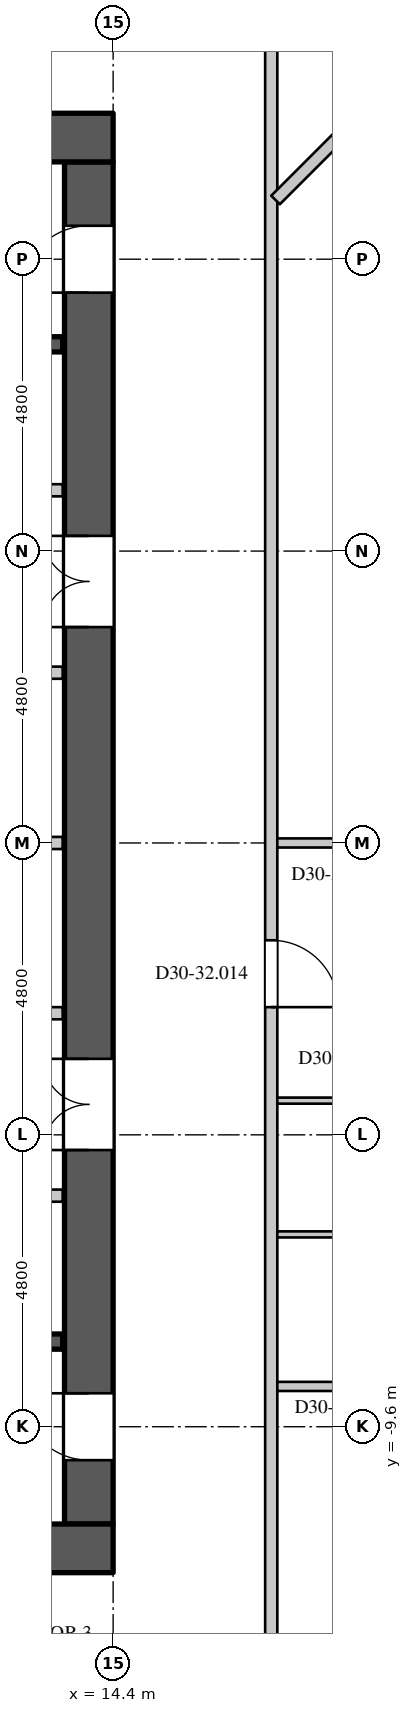
"""IFC4 building model, lengths in metres.
Left out: names, types, materials, properties, quantities, classifications, styles, units other than length and angle.
Written with IfcOpenShell. Run it as: python <this file> out.ifc"""

import sys

from ifc_helpers import new_model, si_unit, direction, frame, frame_2d, origin, place, context, subcontext, project, spatial, rectangle, extrude, element, fill, save


model = new_model("IFC4")
c1 = context("Model", 3, precision=1e-05, world=origin(), true_north=direction((0.0, 1.0)))
c2 = subcontext(c1, "Body", "Model", "MODEL_VIEW")
j1 = project(units=[si_unit("LENGTHUNIT", "METRE"), si_unit("PLANEANGLEUNIT", "RADIAN")], contexts=[c1])
p1 = place(None, origin())
s1 = spatial("IfcSite", under=j1, at=p1, CompositionType="ELEMENT")
p2 = place(p1, origin())
s2 = spatial("IfcBuilding", under=s1, at=p2, CompositionType="ELEMENT")
p3 = place(p2, frame((0.0, 0.0, 131.7)))
s3 = spatial("IfcBuildingStorey", under=s2, at=p3, CompositionType="ELEMENT", Elevation=131.7)
for number, where, z_axis, x_axis in (
    (1, (-14.4, 11.6, 0.0), (0.0, 0.0, 1.0), (1.0, 0.0, 0.0)),
    (2, (-14.4, -11.6, 0.0), (0.0, 0.0, 1.0), (1.0, 0.0, 0.0)),
):
    element("IfcWall", number, at=place(p3, frame(where, z_axis=z_axis, x_axis=x_axis)), inside=s3, PredefinedType="SHEAR", context=c2, shape_type="SweptSolid", body=[
        extrude(rectangle(XDim=28.8, YDim=0.8, at=frame_2d((14.4, 0.0))), origin(), (0.0, 0.0, 1.0), 4.2),
    ])
p4 = place(p3, frame((14.0, -11.2, 0.0), z_axis=(0.0, 0.0, 1.0), x_axis=(0.0, 1.0, 0.0)))
e3 = element("IfcWall", 3, at=p4, inside=s3, PredefinedType="SHEAR", context=c2, shape_type="SweptSolid", body=[
    extrude(rectangle(XDim=22.4, YDim=0.8, at=frame_2d((11.2, 0.0))), origin(), (0.0, 0.0, 1.0), 4.2),
])
p5 = place(p4, frame((20.25, 0.0, 0.0)))
e4 = element("IfcOpeningElement", 4, at=p5, cuts=e3, PredefinedType="OPENING", context=c2, shape_type="SweptSolid", body=[
    extrude(rectangle(XDim=1.1, YDim=2.2, at=frame_2d((0.55, 1.1))), frame((0.0, 0.41, 0.0), z_axis=(0.0, -1.0, 0.0), x_axis=(1.0, 0.0, 0.0)), (0.0, 0.0, 1.0), 0.82),
])
p6 = place(p4, frame((1.05, 0.0, 0.0)))
e5 = element("IfcOpeningElement", 5, at=p6, cuts=e3, PredefinedType="OPENING", context=c2, shape_type="SweptSolid", body=[
    extrude(rectangle(XDim=1.1, YDim=2.2, at=frame_2d((0.55, 1.1))), frame((0.0, 0.41, 0.0), z_axis=(0.0, -1.0, 0.0), x_axis=(1.0, 0.0, 0.0)), (0.0, 0.0, 1.0), 0.82),
])
p7 = place(p4, frame((14.75, 0.0, 0.0)))
e6 = element("IfcOpeningElement", 6, at=p7, cuts=e3, PredefinedType="OPENING", context=c2, shape_type="SweptSolid", body=[
    extrude(rectangle(XDim=1.5, YDim=2.4, at=frame_2d((0.75, 1.2))), frame((0.0, 0.41, 0.0), z_axis=(0.0, -1.0, 0.0), x_axis=(1.0, 0.0, 0.0)), (0.0, 0.0, 1.0), 0.82),
])
p8 = place(p4, frame((6.15, 0.0, 0.0)))
e7 = element("IfcOpeningElement", 7, at=p8, cuts=e3, PredefinedType="OPENING", context=c2, shape_type="SweptSolid", body=[
    extrude(rectangle(XDim=1.5, YDim=2.4, at=frame_2d((0.75, 1.2))), frame((0.0, 0.41, 0.0), z_axis=(0.0, -1.0, 0.0), x_axis=(1.0, 0.0, 0.0)), (0.0, 0.0, 1.0), 0.82),
])
p9 = place(p3, frame((-7.7, 5.8, 0.0), z_axis=(0.0, 0.0, 1.0), x_axis=(1.0, 0.0, 0.0)))
e8 = element("IfcWall", 8, at=p9, inside=s3, PredefinedType="PARTITIONING", context=c2, shape_type="SweptSolid", body=[
    extrude(rectangle(XDim=21.27, YDim=0.2, at=frame_2d((10.635, 0.0))), origin(), (0.0, 0.0, 1.0), 3.95),
])
p10 = place(p9, frame((4.55, 0.0, 0.0)))
e9 = element("IfcOpeningElement", 9, at=p10, cuts=e8, PredefinedType="OPENING", context=c2, shape_type="SweptSolid", body=[
    extrude(rectangle(XDim=0.9, YDim=2.2, at=frame_2d((0.45, 1.1))), frame((0.0, 0.11, 0.0), z_axis=(0.0, -1.0, 0.0), x_axis=(1.0, 0.0, 0.0)), (0.0, 0.0, 1.0), 0.22),
])
p11 = place(p9, frame((15.05, 0.0, 0.0)))
e10 = element("IfcOpeningElement", 10, at=p11, cuts=e8, PredefinedType="OPENING", context=c2, shape_type="SweptSolid", body=[
    extrude(rectangle(XDim=0.9, YDim=2.2, at=frame_2d((0.45, 1.1))), frame((0.0, 0.11, 0.0), z_axis=(0.0, -1.0, 0.0), x_axis=(1.0, 0.0, 0.0)), (0.0, 0.0, 1.0), 0.22),
])
p12 = place(p3, frame((3.58, -5.8, 0.0), z_axis=(0.0, 0.0, 1.0), x_axis=(1.0, 0.0, 0.0)))
e11 = element("IfcWall", 11, at=p12, inside=s3, PredefinedType="PARTITIONING", context=c2, shape_type="SweptSolid", body=[
    extrude(rectangle(XDim=9.99, YDim=0.2, at=frame_2d((4.995, 0.0))), origin(), (0.0, 0.0, 1.0), 3.95),
])
p13 = place(p12, frame((2.0, 0.0, 0.0)))
e12 = element("IfcOpeningElement", 12, at=p13, cuts=e11, PredefinedType="OPENING", context=c2, shape_type="SweptSolid", body=[
    extrude(rectangle(XDim=0.9, YDim=2.2, at=frame_2d((0.45, 1.1))), frame((0.0, 0.11, 0.0), z_axis=(0.0, -1.0, 0.0), x_axis=(1.0, 0.0, 0.0)), (0.0, 0.0, 1.0), 0.22),
])
p14 = place(p12, frame((6.85, 0.0, 0.0)))
e13 = element("IfcOpeningElement", 13, at=p14, cuts=e11, PredefinedType="OPENING", context=c2, shape_type="SweptSolid", body=[
    extrude(rectangle(XDim=0.9, YDim=2.2, at=frame_2d((0.45, 1.1))), frame((0.0, 0.11, 0.0), z_axis=(0.0, -1.0, 0.0), x_axis=(1.0, 0.0, 0.0)), (0.0, 0.0, 1.0), 0.22),
])
p15 = place(p3, frame((17.0, -14.5, 0.0), z_axis=(0.0, 0.0, 1.0), x_axis=(0.0, 1.0, 0.0)))
e14 = element("IfcWall", 14, at=p15, inside=s3, PredefinedType="PARTITIONING", context=c2, shape_type="SweptSolid", body=[
    extrude(rectangle(XDim=29.0, YDim=0.2, at=frame_2d((14.5, 0.0))), origin(), (0.0, 0.0, 1.0), 3.95),
])
p16 = place(p15, frame((11.8, 0.0, 0.0)))
e15 = element("IfcOpeningElement", 15, at=p16, cuts=e14, PredefinedType="OPENING", context=c2, shape_type="SweptSolid", body=[
    extrude(rectangle(XDim=1.1, YDim=2.4, at=frame_2d((0.55, 1.2))), frame((0.0, 0.11, 0.0), z_axis=(0.0, -1.0, 0.0), x_axis=(1.0, 0.0, 0.0)), (0.0, 0.0, 1.0), 0.22),
])
p17 = place(p3, frame((15.509, -18.074, 0.0), z_axis=(0.0, 0.0, 1.0), x_axis=(0.707106781187, 0.707106781187, 0.0)))
e16 = element("IfcWall", 16, at=p17, inside=s3, PredefinedType="PARTITIONING", context=c2, shape_type="SweptSolid", body=[
    extrude(rectangle(XDim=9.255, YDim=0.15, at=frame_2d((4.627, 0.0))), origin(), (0.0, 0.0, 1.0), 3.95),
])
p18 = place(p17, frame((8.1, 0.0, 0.0)))
e17 = element("IfcOpeningElement", 17, at=p18, cuts=e16, PredefinedType="OPENING", context=c2, shape_type="SweptSolid", body=[
    extrude(rectangle(XDim=0.95, YDim=2.2, at=frame_2d((0.475, 1.1))), frame((0.0, 0.085, 0.0), z_axis=(0.0, -1.0, 0.0), x_axis=(1.0, 0.0, 0.0)), (0.0, 0.0, 1.0), 0.17),
])
p19 = place(p17, frame((5.05, 0.0, 0.0)))
e18 = element("IfcOpeningElement", 18, at=p19, cuts=e16, PredefinedType="OPENING", context=c2, shape_type="SweptSolid", body=[
    extrude(rectangle(XDim=0.95, YDim=2.2, at=frame_2d((0.475, 1.1))), frame((0.0, 0.085, 0.0), z_axis=(0.0, -1.0, 0.0), x_axis=(1.0, 0.0, 0.0)), (0.0, 0.0, 1.0), 0.17),
])
p20 = place(p17, frame((0.45, 0.0, 0.0)))
e19 = element("IfcOpeningElement", 19, at=p20, cuts=e16, PredefinedType="OPENING", context=c2, shape_type="SweptSolid", body=[
    extrude(rectangle(XDim=0.95, YDim=2.2, at=frame_2d((0.475, 1.1))), frame((0.0, 0.085, 0.0), z_axis=(0.0, -1.0, 0.0), x_axis=(1.0, 0.0, 0.0)), (0.0, 0.0, 1.0), 0.17),
])
p21 = place(p3, frame((17.1, -8.937, 0.0), z_axis=(0.0, 0.0, 1.0), x_axis=(1.0, 0.0, 0.0)))
e20 = element("IfcWall", 20, at=p21, inside=s3, PredefinedType="PARTITIONING", context=c2, shape_type="SweptSolid", body=[
    extrude(rectangle(XDim=9.325, YDim=0.15, at=frame_2d((4.663, 0.0))), origin(), (0.0, 0.0, 1.0), 3.95),
])
p22 = place(p21, frame((6.35, 0.0, 0.0)))
e21 = element("IfcOpeningElement", 21, at=p22, cuts=e20, PredefinedType="OPENING", context=c2, shape_type="SweptSolid", body=[
    extrude(rectangle(XDim=1.5, YDim=2.2, at=frame_2d((0.75, 1.1))), frame((0.0, 0.085, 0.0), z_axis=(0.0, -1.0, 0.0), x_axis=(1.0, 0.0, 0.0)), (0.0, 0.0, 1.0), 0.17),
])
p23 = place(p21, frame((1.9, 0.0, 0.0)))
e22 = element("IfcOpeningElement", 22, at=p23, cuts=e20, PredefinedType="OPENING", context=c2, shape_type="SweptSolid", body=[
    extrude(rectangle(XDim=0.95, YDim=2.2, at=frame_2d((0.475, 1.1))), frame((0.0, 0.085, 0.0), z_axis=(0.0, -1.0, 0.0), x_axis=(1.0, 0.0, 0.0)), (0.0, 0.0, 1.0), 0.17),
])
p24 = place(p3, frame((17.1, 0.0, 0.0), z_axis=(0.0, 0.0, 1.0), x_axis=(1.0, 0.0, 0.0)))
e23 = element("IfcWall", 23, at=p24, inside=s3, PredefinedType="PARTITIONING", context=c2, shape_type="SweptSolid", body=[
    extrude(rectangle(XDim=2.32, YDim=0.15, at=frame_2d((1.16, 0.0))), origin(), (0.0, 0.0, 1.0), 3.95),
])
p25 = place(p24, frame((1.05, 0.0, 0.0)))
e24 = element("IfcOpeningElement", 24, at=p25, cuts=e23, PredefinedType="OPENING", context=c2, shape_type="SweptSolid", body=[
    extrude(rectangle(XDim=0.95, YDim=2.2, at=frame_2d((0.475, 1.1))), frame((0.0, 0.085, 0.0), z_axis=(0.0, -1.0, 0.0), x_axis=(1.0, 0.0, 0.0)), (0.0, 0.0, 1.0), 0.17),
])
p26 = place(p3, frame((17.071, 10.574, 0.0), z_axis=(0.0, 0.0, 1.0), x_axis=(0.707106781187, 0.707106781187, 0.0)))
e25 = element("IfcWall", 25, at=p26, inside=s3, PredefinedType="PARTITIONING", context=c2, shape_type="SweptSolid", body=[
    extrude(rectangle(XDim=8.655, YDim=0.2, at=frame_2d((4.327, 0.0))), origin(), (0.0, 0.0, 1.0), 3.95),
])
p27 = place(p3, frame((10.38, -2.8, 0.0), z_axis=(0.0, 0.0, 1.0), x_axis=(1.0, 0.0, 0.0)))
e26 = element("IfcWall", 26, at=p27, inside=s3, PredefinedType="PARTITIONING", context=c2, shape_type="SweptSolid", body=[
    extrude(rectangle(XDim=3.19, YDim=0.2, at=frame_2d((1.595, 0.0))), origin(), (0.0, 0.0, 1.0), 3.95),
])
p28 = place(p27, frame((1.1, 0.0, 0.0)))
e27 = element("IfcOpeningElement", 27, at=p28, cuts=e26, PredefinedType="OPENING", context=c2, shape_type="SweptSolid", body=[
    extrude(rectangle(XDim=0.9, YDim=2.2, at=frame_2d((0.45, 1.1))), frame((0.0, 0.11, 0.0), z_axis=(0.0, -1.0, 0.0), x_axis=(1.0, 0.0, 0.0)), (0.0, 0.0, 1.0), 0.22),
])
p29 = place(p3, frame((10.4, 2.8, 0.0), z_axis=(0.0, 0.0, 1.0), x_axis=(1.0, 0.0, 0.0)))
e28 = element("IfcWall", 28, at=p29, inside=s3, PredefinedType="PARTITIONING", context=c2, shape_type="SweptSolid", body=[
    extrude(rectangle(XDim=3.17, YDim=0.2, at=frame_2d((1.585, 0.0))), origin(), (0.0, 0.0, 1.0), 3.95),
])
p30 = place(p29, frame((1.25, 0.0, 0.0)))
e29 = element("IfcOpeningElement", 29, at=p30, cuts=e28, PredefinedType="OPENING", context=c2, shape_type="SweptSolid", body=[
    extrude(rectangle(XDim=0.6, YDim=2.0, at=frame_2d((0.3, 1.0))), frame((0.0, 0.11, 0.0), z_axis=(0.0, -1.0, 0.0), x_axis=(1.0, 0.0, 0.0)), (0.0, 0.0, 1.0), 0.22),
])
p31 = place(p3, frame((10.4, 0.0, 0.0), z_axis=(0.0, 0.0, 1.0), x_axis=(1.0, 0.0, 0.0)))
e30 = element("IfcWall", 30, at=p31, inside=s3, PredefinedType="PARTITIONING", context=c2, shape_type="SweptSolid", body=[
    extrude(rectangle(XDim=3.17, YDim=0.2, at=frame_2d((1.585, 0.0))), origin(), (0.0, 0.0, 1.0), 3.95),
])
for number, where, z_axis, x_axis in (
    (31, (5.275, -8.2, 0.0), (0.0, 0.0, 1.0), (1.0, 0.0, 0.0)),
    (32, (5.275, 8.2, 0.0), (0.0, 0.0, 1.0), (1.0, 0.0, 0.0)),
):
    element("IfcWall", number, at=place(p3, frame(where, z_axis=z_axis, x_axis=x_axis)), inside=s3, PredefinedType="SHEAR", context=c2, shape_type="SweptSolid", body=[
        extrude(rectangle(XDim=8.295, YDim=0.25, at=frame_2d((4.147, 0.0))), origin(), (0.0, 0.0, 1.0), 3.95),
    ])
p32 = place(p3, frame((17.1, -6.437, 0.0), z_axis=(0.0, 0.0, 1.0), x_axis=(1.0, 0.0, 0.0)))
e33 = element("IfcWall", 33, at=p32, inside=s3, PredefinedType="PARTITIONING", context=c2, shape_type="SweptSolid", body=[
    extrude(rectangle(XDim=3.825, YDim=0.1, at=frame_2d((1.913, 0.0))), origin(), (0.0, 0.0, 1.0), 3.95),
])
p33 = place(p3, frame((17.1, -4.237, 0.0), z_axis=(0.0, 0.0, 1.0), x_axis=(1.0, 0.0, 0.0)))
e34 = element("IfcWall", 34, at=p33, inside=s3, PredefinedType="PARTITIONING", context=c2, shape_type="SweptSolid", body=[
    extrude(rectangle(XDim=3.825, YDim=0.1, at=frame_2d((1.913, 0.0))), origin(), (0.0, 0.0, 1.0), 3.3),
])
p34 = place(p33, frame((1.85, 0.0, 0.0)))
e35 = element("IfcOpeningElement", 35, at=p34, cuts=e34, PredefinedType="OPENING", context=c2, shape_type="SweptSolid", body=[
    extrude(rectangle(XDim=0.9, YDim=2.2, at=frame_2d((0.45, 1.1))), frame((0.0, 0.06, 0.0), z_axis=(0.0, -1.0, 0.0), x_axis=(1.0, 0.0, 0.0)), (0.0, 0.0, 1.0), 0.12),
])
p35 = place(p5, origin())
e36 = element("IfcDoor", 36, at=p35, inside=s3, OperationType="SINGLE_SWING_LEFT", PredefinedType="DOOR", context=c2, shape_type="SweptSolid", body=[
    extrude(rectangle(XDim=1.1, YDim=2.2, at=frame_2d((0.55, 1.1))), frame((0.0, 0.395, 0.0), z_axis=(0.0, -1.0, 0.0), x_axis=(1.0, 0.0, 0.0)), (0.0, 0.0, 1.0), 0.05),
])
fill(e4, e36)
p36 = place(p6, origin())
e37 = element("IfcDoor", 37, at=p36, inside=s3, OperationType="SINGLE_SWING_RIGHT", PredefinedType="DOOR", context=c2, shape_type="SweptSolid", body=[
    extrude(rectangle(XDim=1.1, YDim=2.2, at=frame_2d((0.55, 1.1))), frame((0.0, 0.395, 0.0), z_axis=(0.0, -1.0, 0.0), x_axis=(1.0, 0.0, 0.0)), (0.0, 0.0, 1.0), 0.05),
])
fill(e5, e37)
p37 = place(p7, origin())
e38 = element("IfcDoor", 38, at=p37, inside=s3, OperationType="DOUBLE_DOOR_SINGLE_SWING", PredefinedType="DOOR", context=c2, shape_type="SweptSolid", body=[
    extrude(rectangle(XDim=1.5, YDim=2.4, at=frame_2d((0.75, 1.2))), frame((0.0, 0.395, 0.0), z_axis=(0.0, -1.0, 0.0), x_axis=(1.0, 0.0, 0.0)), (0.0, 0.0, 1.0), 0.05),
])
fill(e6, e38)
p38 = place(p8, origin())
e39 = element("IfcDoor", 39, at=p38, inside=s3, OperationType="DOUBLE_DOOR_SINGLE_SWING", PredefinedType="DOOR", context=c2, shape_type="SweptSolid", body=[
    extrude(rectangle(XDim=1.5, YDim=2.4, at=frame_2d((0.75, 1.2))), frame((0.0, 0.395, 0.0), z_axis=(0.0, -1.0, 0.0), x_axis=(1.0, 0.0, 0.0)), (0.0, 0.0, 1.0), 0.05),
])
fill(e7, e39)
p39 = place(p16, origin())
e40 = element("IfcDoor", 40, at=p39, inside=s3, OperationType="SINGLE_SWING_RIGHT", PredefinedType="DOOR", context=c2, shape_type="SweptSolid", body=[
    extrude(rectangle(XDim=1.1, YDim=2.4, at=frame_2d((0.55, 1.2))), frame((0.0, 0.025, 0.0), z_axis=(0.0, -1.0, 0.0), x_axis=(1.0, 0.0, 0.0)), (0.0, 0.0, 1.0), 0.05),
])
fill(e15, e40)
save(model, sys.argv[1])
